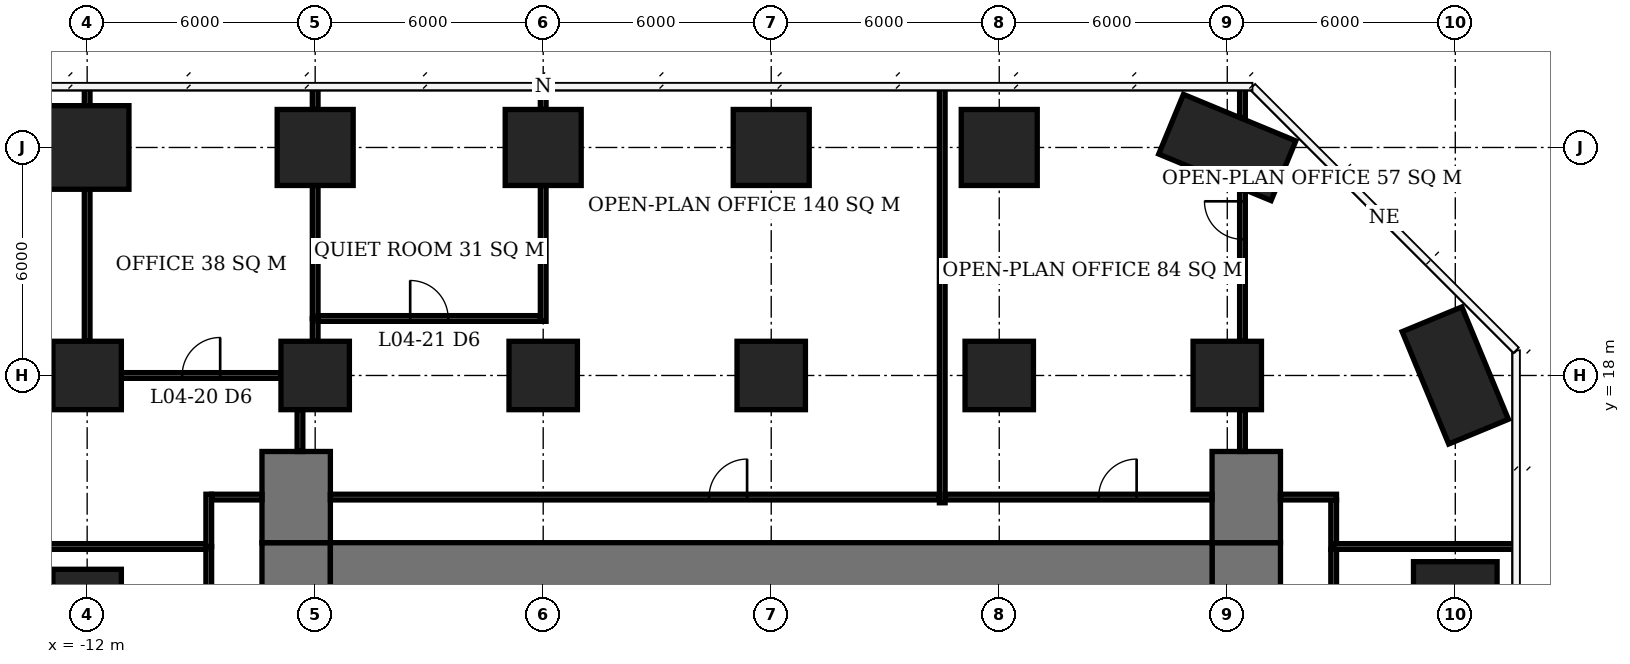
"""IFC4 building model, lengths in metres.
Left out: names, types, materials, properties, quantities, classifications, styles, units other than length and angle.
Written with IfcOpenShell. Run it as: python <this file> out.ifc"""

import sys

from ifc_helpers import new_model, si_unit, direction, frame, frame_2d, origin, origin_2d, place, context, subcontext, project, spatial, rectangle, extrude, element, fill, save


model = new_model("IFC4")
c1 = context("Model", 3, precision=1e-05, world=origin(), true_north=direction((0.0, 1.0)))
c2 = subcontext(c1, "Body", "Model", "MODEL_VIEW")
j1 = project(units=[si_unit("LENGTHUNIT", "METRE"), si_unit("PLANEANGLEUNIT", "RADIAN")], contexts=[c1])
p1 = place(None, origin())
s1 = spatial("IfcSite", under=j1, at=p1, CompositionType="ELEMENT")
p2 = place(p1, origin())
s2 = spatial("IfcBuilding", under=s1, at=p2, CompositionType="ELEMENT")
p3 = place(p2, frame((0.0, 0.0, 22.1)))
s3 = spatial("IfcBuildingStorey", under=s2, at=p3, CompositionType="ELEMENT", Elevation=22.1)
for number, where, z_axis, x_axis in (
    (1, (-12.0, 12.0, 0.0), (0.0, 0.0, 1.0), (1.0, 0.0, 0.0)),
    (2, (-12.0, 18.0, 0.0), (0.0, 0.0, 1.0), (1.0, 0.0, 0.0)),
):
    element("IfcColumn", number, at=place(p3, frame(where, z_axis=z_axis, x_axis=x_axis)), inside=s3, PredefinedType="COLUMN", context=c2, shape_type="SweptSolid", body=[
        extrude(rectangle(XDim=1.8, YDim=1.8, at=origin_2d()), origin(), (0.0, 0.0, 1.0), 3.9),
    ])
p4 = place(p3, frame((-12.0, 24.0, 0.0), z_axis=(0.0, 0.0, 1.0), x_axis=(1.0, 0.0, 0.0)))
e3 = element("IfcColumn", 3, at=p4, inside=s3, PredefinedType="COLUMN", context=c2, shape_type="SweptSolid", body=[
    extrude(rectangle(XDim=2.2, YDim=2.2, at=origin_2d()), origin(), (0.0, 0.0, 1.0), 3.9),
])
p5 = place(p3, frame((-6.0, 18.0, 0.0), z_axis=(0.0, 0.0, 1.0), x_axis=(1.0, 0.0, 0.0)))
e4 = element("IfcColumn", 4, at=p5, inside=s3, PredefinedType="COLUMN", context=c2, shape_type="SweptSolid", body=[
    extrude(rectangle(XDim=1.8, YDim=1.8, at=origin_2d()), origin(), (0.0, 0.0, 1.0), 3.9),
])
p6 = place(p3, frame((-6.0, 24.0, 0.0), z_axis=(0.0, 0.0, 1.0), x_axis=(1.0, 0.0, 0.0)))
e5 = element("IfcColumn", 5, at=p6, inside=s3, PredefinedType="COLUMN", context=c2, shape_type="SweptSolid", body=[
    extrude(rectangle(XDim=2.0, YDim=2.0, at=origin_2d()), origin(), (0.0, 0.0, 1.0), 3.9),
])
p7 = place(p3, frame((0.0, 18.0, 0.0), z_axis=(0.0, 0.0, 1.0), x_axis=(1.0, 0.0, 0.0)))
e6 = element("IfcColumn", 6, at=p7, inside=s3, PredefinedType="COLUMN", context=c2, shape_type="SweptSolid", body=[
    extrude(rectangle(XDim=1.8, YDim=1.8, at=origin_2d()), origin(), (0.0, 0.0, 1.0), 3.9),
])
p8 = place(p3, frame((0.0, 24.0, 0.0), z_axis=(0.0, 0.0, 1.0), x_axis=(1.0, 0.0, 0.0)))
e7 = element("IfcColumn", 7, at=p8, inside=s3, PredefinedType="COLUMN", context=c2, shape_type="SweptSolid", body=[
    extrude(rectangle(XDim=2.0, YDim=2.0, at=origin_2d()), origin(), (0.0, 0.0, 1.0), 3.9),
])
p9 = place(p3, frame((6.0, 18.0, 0.0), z_axis=(0.0, 0.0, 1.0), x_axis=(1.0, 0.0, 0.0)))
e8 = element("IfcColumn", 8, at=p9, inside=s3, PredefinedType="COLUMN", context=c2, shape_type="SweptSolid", body=[
    extrude(rectangle(XDim=1.8, YDim=1.8, at=origin_2d()), origin(), (0.0, 0.0, 1.0), 3.9),
])
p10 = place(p3, frame((6.0, 24.0, 0.0), z_axis=(0.0, 0.0, 1.0), x_axis=(1.0, 0.0, 0.0)))
e9 = element("IfcColumn", 9, at=p10, inside=s3, PredefinedType="COLUMN", context=c2, shape_type="SweptSolid", body=[
    extrude(rectangle(XDim=2.0, YDim=2.0, at=origin_2d()), origin(), (0.0, 0.0, 1.0), 3.9),
])
p11 = place(p3, frame((12.0, 18.0, 0.0), z_axis=(0.0, 0.0, 1.0), x_axis=(1.0, 0.0, 0.0)))
e10 = element("IfcColumn", 10, at=p11, inside=s3, PredefinedType="COLUMN", context=c2, shape_type="SweptSolid", body=[
    extrude(rectangle(XDim=1.8, YDim=1.8, at=origin_2d()), origin(), (0.0, 0.0, 1.0), 3.9),
])
p12 = place(p3, frame((12.0, 24.0, 0.0), z_axis=(0.0, 0.0, 1.0), x_axis=(1.0, 0.0, 0.0)))
e11 = element("IfcColumn", 11, at=p12, inside=s3, PredefinedType="COLUMN", context=c2, shape_type="SweptSolid", body=[
    extrude(rectangle(XDim=2.0, YDim=2.0, at=origin_2d()), origin(), (0.0, 0.0, 1.0), 3.9),
])
p13 = place(p3, frame((18.0, 18.0, 0.0), z_axis=(0.0, 0.0, 1.0), x_axis=(1.0, 0.0, 0.0)))
e12 = element("IfcColumn", 12, at=p13, inside=s3, PredefinedType="COLUMN", context=c2, shape_type="SweptSolid", body=[
    extrude(rectangle(XDim=1.8, YDim=1.8, at=origin_2d()), origin(), (0.0, 0.0, 1.0), 3.9),
])
p14 = place(p3, frame((18.0, 24.0, 0.0), z_axis=(0.0, 0.0, 1.0), x_axis=(0.923879532511, -0.382683432365, 0.0)))
e13 = element("IfcColumn", 13, at=p14, inside=s3, PredefinedType="COLUMN", context=c2, shape_type="SweptSolid", body=[
    extrude(rectangle(XDim=3.2, YDim=1.7, at=origin_2d()), origin(), (0.0, 0.0, 1.0), 3.9),
])
p15 = place(p3, frame((24.0, 12.0, 0.0), z_axis=(0.0, 0.0, 1.0), x_axis=(1.0, 0.0, 0.0)))
e14 = element("IfcColumn", 14, at=p15, inside=s3, PredefinedType="COLUMN", context=c2, shape_type="SweptSolid", body=[
    extrude(rectangle(XDim=2.2, YDim=2.2, at=origin_2d()), origin(), (0.0, 0.0, 1.0), 3.9),
])
p16 = place(p3, frame((24.0, 18.0, 0.0), z_axis=(0.0, 0.0, 1.0), x_axis=(0.382683432365, -0.923879532511, 0.0)))
e15 = element("IfcColumn", 15, at=p16, inside=s3, PredefinedType="COLUMN", context=c2, shape_type="SweptSolid", body=[
    extrude(rectangle(XDim=3.2, YDim=1.7, at=origin_2d()), origin(), (0.0, 0.0, 1.0), 3.9),
])
p17 = place(p3, frame((-5.6, 12.6, 0.0), z_axis=(0.0, 0.0, 1.0), x_axis=(1.0, 0.0, 0.0)))
e16 = element("IfcWall", 16, at=p17, inside=s3, PredefinedType="SHEAR", context=c2, shape_type="SweptSolid", body=[
    extrude(rectangle(XDim=23.2, YDim=2.0, at=frame_2d((11.6, 0.0))), origin(), (0.0, 0.0, 1.0), 3.9),
])
p18 = place(p3, frame((-6.5, -7.6, 0.0), z_axis=(0.0, 0.0, 1.0), x_axis=(0.0, 1.0, 0.0)))
e17 = element("IfcWall", 17, at=p18, inside=s3, PredefinedType="SHEAR", context=c2, shape_type="SweptSolid", body=[
    extrude(rectangle(XDim=21.2, YDim=1.8, at=frame_2d((10.6, 0.0))), origin(), (0.0, 0.0, 1.0), 3.9),
])
p19 = place(p18, frame((7.8, 0.0, 0.0)))
e18 = element("IfcOpeningElement", 18, at=p19, cuts=e17, PredefinedType="OPENING", context=c2, shape_type="SweptSolid", body=[
    extrude(rectangle(XDim=1.8, YDim=2.4, at=frame_2d((0.9, 1.2))), frame((0.0, 0.91, 0.0), z_axis=(0.0, -1.0, 0.0), x_axis=(1.0, 0.0, 0.0)), (0.0, 0.0, 1.0), 1.82),
])
p20 = place(p3, frame((18.5, -7.6, 0.0), z_axis=(0.0, 0.0, 1.0), x_axis=(0.0, 1.0, 0.0)))
e19 = element("IfcWall", 19, at=p20, inside=s3, PredefinedType="SHEAR", context=c2, shape_type="SweptSolid", body=[
    extrude(rectangle(XDim=21.2, YDim=1.8, at=frame_2d((10.6, 0.0))), origin(), (0.0, 0.0, 1.0), 3.9),
])
p21 = place(p20, frame((9.2, 0.0, 0.0)))
e20 = element("IfcOpeningElement", 20, at=p21, cuts=e19, PredefinedType="OPENING", context=c2, shape_type="SweptSolid", body=[
    extrude(rectangle(XDim=1.8, YDim=2.4, at=frame_2d((0.9, 1.2))), frame((0.0, 0.91, 0.0), z_axis=(0.0, -1.0, 0.0), x_axis=(1.0, 0.0, 0.0)), (0.0, 0.0, 1.0), 1.82),
])
for number, where, z_axis, x_axis in (
    (21, (-6.5, 13.6, 0.0), (0.0, 0.0, 1.0), (0.0, 1.0, 0.0)),
    (22, (18.5, 13.6, 0.0), (0.0, 0.0, 1.0), (0.0, 1.0, 0.0)),
):
    element("IfcWall", number, at=place(p3, frame(where, z_axis=z_axis, x_axis=x_axis)), inside=s3, PredefinedType="SHEAR", context=c2, shape_type="SweptSolid", body=[
        extrude(rectangle(XDim=2.4, YDim=1.8, at=frame_2d((1.2, 0.0))), origin(), (0.0, 0.0, 1.0), 3.9),
    ])
p22 = place(p3, frame((-11.1, 18.0, 0.0), z_axis=(0.0, 0.0, 1.0), x_axis=(1.0, 0.0, 0.0)))
e23 = element("IfcWall", 23, at=p22, inside=s3, PredefinedType="PARTITIONING", context=c2, shape_type="SweptSolid", body=[
    extrude(rectangle(XDim=4.2, YDim=0.15, at=frame_2d((2.1, 0.0))), origin(), (0.0, 0.0, 1.0), 3.65),
])
p23 = place(p22, frame((1.6, 0.0, 0.0)))
e24 = element("IfcOpeningElement", 24, at=p23, cuts=e23, PredefinedType="OPENING", context=c2, shape_type="SweptSolid", body=[
    extrude(rectangle(XDim=1.0, YDim=2.1, at=frame_2d((0.5, 1.05))), frame((0.0, 0.085, 0.0), z_axis=(0.0, -1.0, 0.0), x_axis=(1.0, 0.0, 0.0)), (0.0, 0.0, 1.0), 0.17),
])
p24 = place(p3, frame((-5.925, 19.5, 0.0), z_axis=(0.0, 0.0, 1.0), x_axis=(1.0, 0.0, 0.0)))
e25 = element("IfcWall", 25, at=p24, inside=s3, PredefinedType="PARTITIONING", context=c2, shape_type="SweptSolid", body=[
    extrude(rectangle(XDim=5.85, YDim=0.15, at=frame_2d((2.925, 0.0))), origin(), (0.0, 0.0, 1.0), 3.65),
])
p25 = place(p24, frame((2.425, 0.0, 0.0)))
e26 = element("IfcOpeningElement", 26, at=p25, cuts=e25, PredefinedType="OPENING", context=c2, shape_type="SweptSolid", body=[
    extrude(rectangle(XDim=1.0, YDim=2.1, at=frame_2d((0.5, 1.05))), frame((0.0, 0.085, 0.0), z_axis=(0.0, -1.0, 0.0), x_axis=(1.0, 0.0, 0.0)), (0.0, 0.0, 1.0), 0.17),
])
p26 = place(p3, frame((-12.0, 18.9, 0.0), z_axis=(0.0, 0.0, 1.0), x_axis=(0.0, 1.0, 0.0)))
e27 = element("IfcWall", 27, at=p26, inside=s3, PredefinedType="PARTITIONING", context=c2, shape_type="SweptSolid", body=[
    extrude(rectangle(XDim=4.0, YDim=0.15, at=frame_2d((2.0, 0.0))), origin(), (0.0, 0.0, 1.0), 3.65),
])
p27 = place(p3, frame((-12.0, 25.1, 0.0), z_axis=(0.0, 0.0, 1.0), x_axis=(0.0, 1.0, 0.0)))
e28 = element("IfcWall", 28, at=p27, inside=s3, PredefinedType="PARTITIONING", context=c2, shape_type="SweptSolid", body=[
    extrude(rectangle(XDim=0.5, YDim=0.15, at=frame_2d((0.25, 0.0))), origin(), (0.0, 0.0, 1.0), 3.65),
])
p28 = place(p3, frame((-6.0, 18.9, 0.0), z_axis=(0.0, 0.0, 1.0), x_axis=(0.0, 1.0, 0.0)))
e29 = element("IfcWall", 29, at=p28, inside=s3, PredefinedType="PARTITIONING", context=c2, shape_type="SweptSolid", body=[
    extrude(rectangle(XDim=0.6, YDim=0.15, at=frame_2d((0.3, 0.0))), origin(), (0.0, 0.0, 1.0), 3.65),
])
p29 = place(p3, frame((-6.0, 19.5, 0.0), z_axis=(0.0, 0.0, 1.0), x_axis=(0.0, 1.0, 0.0)))
e30 = element("IfcWall", 30, at=p29, inside=s3, PredefinedType="PARTITIONING", context=c2, shape_type="SweptSolid", body=[
    extrude(rectangle(XDim=3.5, YDim=0.15, at=frame_2d((1.75, 0.0))), origin(), (0.0, 0.0, 1.0), 3.65),
])
p30 = place(p3, frame((-6.0, 25.0, 0.0), z_axis=(0.0, 0.0, 1.0), x_axis=(0.0, 1.0, 0.0)))
e31 = element("IfcWall", 31, at=p30, inside=s3, PredefinedType="PARTITIONING", context=c2, shape_type="SweptSolid", body=[
    extrude(rectangle(XDim=0.6, YDim=0.15, at=frame_2d((0.3, 0.0))), origin(), (0.0, 0.0, 1.0), 3.65),
])
p31 = place(p3, frame((0.0, 19.425, 0.0), z_axis=(0.0, 0.0, 1.0), x_axis=(0.0, 1.0, 0.0)))
e32 = element("IfcWall", 32, at=p31, inside=s3, PredefinedType="PARTITIONING", context=c2, shape_type="SweptSolid", body=[
    extrude(rectangle(XDim=3.575, YDim=0.15, at=frame_2d((1.788, 0.0))), origin(), (0.0, 0.0, 1.0), 3.65),
])
p32 = place(p3, frame((0.0, 25.0, 0.0), z_axis=(0.0, 0.0, 1.0), x_axis=(0.0, 1.0, 0.0)))
e33 = element("IfcWall", 33, at=p32, inside=s3, PredefinedType="PARTITIONING", context=c2, shape_type="SweptSolid", body=[
    extrude(rectangle(XDim=0.55, YDim=0.15, at=frame_2d((0.275, 0.0))), origin(), (0.0, 0.0, 1.0), 3.65),
])
p33 = place(p3, frame((-25.6, 13.5, 0.0), z_axis=(0.0, 0.0, 1.0), x_axis=(1.0, 0.0, 0.0)))
e34 = element("IfcWall", 34, at=p33, inside=s3, PredefinedType="PARTITIONING", context=c2, shape_type="SweptSolid", body=[
    extrude(rectangle(XDim=16.725, YDim=0.15, at=frame_2d((8.363, 0.0))), origin(), (0.0, 0.0, 1.0), 3.65),
])
p34 = place(p33, frame((10.455, 0.0, 0.0)))
e35 = element("IfcOpeningElement", 35, at=p34, cuts=e34, PredefinedType="OPENING", context=c2, shape_type="SweptSolid", body=[
    extrude(rectangle(XDim=1.0, YDim=2.1, at=frame_2d((0.5, 1.05))), frame((0.0, 0.085, 0.0), z_axis=(0.0, -1.0, 0.0), x_axis=(1.0, 0.0, 0.0)), (0.0, 0.0, 1.0), 0.17),
])
p35 = place(p3, frame((-8.8, 4.575, 0.0), z_axis=(0.0, 0.0, 1.0), x_axis=(0.0, 1.0, 0.0)))
e36 = element("IfcWall", 36, at=p35, inside=s3, PredefinedType="PARTITIONING", context=c2, shape_type="SweptSolid", body=[
    extrude(rectangle(XDim=8.925, YDim=0.15, at=frame_2d((4.462, 0.0))), origin(), (0.0, 0.0, 1.0), 3.65),
])
p36 = place(p35, frame((2.575, 0.0, 0.0)))
e37 = element("IfcOpeningElement", 37, at=p36, cuts=e36, PredefinedType="OPENING", context=c2, shape_type="SweptSolid", body=[
    extrude(rectangle(XDim=1.0, YDim=2.1, at=frame_2d((0.5, 1.05))), frame((0.0, 0.085, 0.0), z_axis=(0.0, -1.0, 0.0), x_axis=(1.0, 0.0, 0.0)), (0.0, 0.0, 1.0), 0.17),
])
p37 = place(p3, frame((-8.8, 13.5, 0.0), z_axis=(0.0, 0.0, 1.0), x_axis=(0.0, 1.0, 0.0)))
e38 = element("IfcWall", 38, at=p37, inside=s3, PredefinedType="PARTITIONING", context=c2, shape_type="SweptSolid", body=[
    extrude(rectangle(XDim=1.375, YDim=0.15, at=frame_2d((0.688, 0.0))), origin(), (0.0, 0.0, 1.0), 3.65),
])
p38 = place(p3, frame((-8.725, 14.8, 0.0), z_axis=(0.0, 0.0, 1.0), x_axis=(1.0, 0.0, 0.0)))
e39 = element("IfcWall", 39, at=p38, inside=s3, PredefinedType="PARTITIONING", context=c2, shape_type="SweptSolid", body=[
    extrude(rectangle(XDim=1.325, YDim=0.15, at=frame_2d((0.663, 0.0))), origin(), (0.0, 0.0, 1.0), 3.65),
])
p39 = place(p3, frame((-6.4, 16.0, 0.0), z_axis=(0.0, 0.0, 1.0), x_axis=(0.0, 1.0, 0.0)))
e40 = element("IfcWall", 40, at=p39, inside=s3, PredefinedType="PARTITIONING", context=c2, shape_type="SweptSolid", body=[
    extrude(rectangle(XDim=1.1, YDim=0.15, at=frame_2d((0.55, 0.0))), origin(), (0.0, 0.0, 1.0), 3.65),
])
p40 = place(p3, frame((-5.6, 14.8, 0.0), z_axis=(0.0, 0.0, 1.0), x_axis=(1.0, 0.0, 0.0)))
e41 = element("IfcWall", 41, at=p40, inside=s3, PredefinedType="PARTITIONING", context=c2, shape_type="SweptSolid", body=[
    extrude(rectangle(XDim=16.025, YDim=0.15, at=frame_2d((8.013, 0.0))), origin(), (0.0, 0.0, 1.0), 3.65),
])
p41 = place(p40, frame((9.965, 0.0, 0.0)))
e42 = element("IfcOpeningElement", 42, at=p41, cuts=e41, PredefinedType="OPENING", context=c2, shape_type="SweptSolid", body=[
    extrude(rectangle(XDim=1.0, YDim=2.1, at=frame_2d((0.5, 1.05))), frame((0.0, 0.085, 0.0), z_axis=(0.0, -1.0, 0.0), x_axis=(1.0, 0.0, 0.0)), (0.0, 0.0, 1.0), 0.17),
])
p42 = place(p3, frame((10.5, 14.65, 0.0), z_axis=(0.0, 0.0, 1.0), x_axis=(0.0, 1.0, 0.0)))
e43 = element("IfcWall", 43, at=p42, inside=s3, PredefinedType="PARTITIONING", context=c2, shape_type="SweptSolid", body=[
    extrude(rectangle(XDim=10.95, YDim=0.15, at=frame_2d((5.475, 0.0))), origin(), (0.0, 0.0, 1.0), 3.65),
])
p43 = place(p3, frame((10.575, 14.8, 0.0), z_axis=(0.0, 0.0, 1.0), x_axis=(1.0, 0.0, 0.0)))
e44 = element("IfcWall", 44, at=p43, inside=s3, PredefinedType="PARTITIONING", context=c2, shape_type="SweptSolid", body=[
    extrude(rectangle(XDim=7.025, YDim=0.15, at=frame_2d((3.513, 0.0))), origin(), (0.0, 0.0, 1.0), 3.65),
])
p44 = place(p43, frame((4.04, 0.0, 0.0)))
e45 = element("IfcOpeningElement", 45, at=p44, cuts=e44, PredefinedType="OPENING", context=c2, shape_type="SweptSolid", body=[
    extrude(rectangle(XDim=1.0, YDim=2.1, at=frame_2d((0.5, 1.05))), frame((0.0, 0.085, 0.0), z_axis=(0.0, -1.0, 0.0), x_axis=(1.0, 0.0, 0.0)), (0.0, 0.0, 1.0), 0.17),
])
p45 = place(p3, frame((18.4, 16.0, 0.0), z_axis=(0.0, 0.0, 1.0), x_axis=(0.0, 1.0, 0.0)))
e46 = element("IfcWall", 46, at=p45, inside=s3, PredefinedType="PARTITIONING", context=c2, shape_type="SweptSolid", body=[
    extrude(rectangle(XDim=1.1, YDim=0.15, at=frame_2d((0.55, 0.0))), origin(), (0.0, 0.0, 1.0), 3.65),
])
p46 = place(p3, frame((18.4, 18.9, 0.0), z_axis=(0.0, 0.0, 1.0), x_axis=(0.0, 1.0, 0.0)))
e47 = element("IfcWall", 47, at=p46, inside=s3, PredefinedType="PARTITIONING", context=c2, shape_type="SweptSolid", body=[
    extrude(rectangle(XDim=3.983, YDim=0.15, at=frame_2d((1.992, 0.0))), origin(), (0.0, 0.0, 1.0), 3.65),
])
p47 = place(p46, frame((2.683, 0.0, 0.0)))
e48 = element("IfcOpeningElement", 48, at=p47, cuts=e47, PredefinedType="OPENING", context=c2, shape_type="SweptSolid", body=[
    extrude(rectangle(XDim=1.0, YDim=2.1, at=frame_2d((0.5, 1.05))), frame((0.0, 0.085, 0.0), z_axis=(0.0, -1.0, 0.0), x_axis=(1.0, 0.0, 0.0)), (0.0, 0.0, 1.0), 0.17),
])
p48 = place(p3, frame((18.4, 24.785, 0.0), z_axis=(0.0, 0.0, 1.0), x_axis=(0.0, 1.0, 0.0)))
e49 = element("IfcWall", 49, at=p48, inside=s3, PredefinedType="PARTITIONING", context=c2, shape_type="SweptSolid", body=[
    extrude(rectangle(XDim=0.815, YDim=0.15, at=frame_2d((0.407, 0.0))), origin(), (0.0, 0.0, 1.0), 3.65),
])
p49 = place(p3, frame((19.4, 14.8, 0.0), z_axis=(0.0, 0.0, 1.0), x_axis=(1.0, 0.0, 0.0)))
e50 = element("IfcWall", 50, at=p49, inside=s3, PredefinedType="PARTITIONING", context=c2, shape_type="SweptSolid", body=[
    extrude(rectangle(XDim=1.475, YDim=0.15, at=frame_2d((0.738, 0.0))), origin(), (0.0, 0.0, 1.0), 3.65),
])
p50 = place(p3, frame((20.8, -8.725, 0.0), z_axis=(0.0, 0.0, 1.0), x_axis=(0.0, 1.0, 0.0)))
e51 = element("IfcWall", 51, at=p50, inside=s3, PredefinedType="PARTITIONING", context=c2, shape_type="SweptSolid", body=[
    extrude(rectangle(XDim=22.15, YDim=0.15, at=frame_2d((11.075, 0.0))), origin(), (0.0, 0.0, 1.0), 3.65),
])
p51 = place(p50, frame((7.23, 0.0, 0.0)))
e52 = element("IfcOpeningElement", 52, at=p51, cuts=e51, PredefinedType="OPENING", context=c2, shape_type="SweptSolid", body=[
    extrude(rectangle(XDim=1.0, YDim=2.1, at=frame_2d((0.5, 1.05))), frame((0.0, 0.085, 0.0), z_axis=(0.0, -1.0, 0.0), x_axis=(1.0, 0.0, 0.0)), (0.0, 0.0, 1.0), 0.17),
])
p52 = place(p3, frame((20.8, 13.425, 0.0), z_axis=(0.0, 0.0, 1.0), x_axis=(0.0, 1.0, 0.0)))
e53 = element("IfcWall", 53, at=p52, inside=s3, PredefinedType="PARTITIONING", context=c2, shape_type="SweptSolid", body=[
    extrude(rectangle(XDim=1.3, YDim=0.15, at=frame_2d((0.65, 0.0))), origin(), (0.0, 0.0, 1.0), 3.65),
])
p53 = place(p3, frame((20.8, 13.5, 0.0), z_axis=(0.0, 0.0, 1.0), x_axis=(1.0, 0.0, 0.0)))
e54 = element("IfcWall", 54, at=p53, inside=s3, PredefinedType="PARTITIONING", context=c2, shape_type="SweptSolid", body=[
    extrude(rectangle(XDim=4.8, YDim=0.15, at=frame_2d((2.4, 0.0))), origin(), (0.0, 0.0, 1.0), 3.65),
])
p54 = place(p23, origin())
e55 = element("IfcDoor", 55, at=p54, inside=s3, OperationType="SINGLE_SWING_RIGHT", PredefinedType="DOOR", context=c2, shape_type="SweptSolid", body=[
    extrude(rectangle(XDim=1.0, YDim=2.1, at=frame_2d((0.5, 1.05))), frame((0.0, 0.025, 0.0), z_axis=(0.0, -1.0, 0.0), x_axis=(1.0, 0.0, 0.0)), (0.0, 0.0, 1.0), 0.05),
])
fill(e24, e55)
p55 = place(p25, origin())
e56 = element("IfcDoor", 56, at=p55, inside=s3, OperationType="SINGLE_SWING_LEFT", PredefinedType="DOOR", context=c2, shape_type="SweptSolid", body=[
    extrude(rectangle(XDim=1.0, YDim=2.1, at=frame_2d((0.5, 1.05))), frame((0.0, 0.025, 0.0), z_axis=(0.0, -1.0, 0.0), x_axis=(1.0, 0.0, 0.0)), (0.0, 0.0, 1.0), 0.05),
])
fill(e26, e56)
p56 = place(p47, origin())
e57 = element("IfcDoor", 57, at=p56, inside=s3, OperationType="SINGLE_SWING_RIGHT", PredefinedType="DOOR", context=c2, shape_type="SweptSolid", body=[
    extrude(rectangle(XDim=1.0, YDim=2.1, at=frame_2d((0.5, 1.05))), frame((0.0, 0.025, 0.0), z_axis=(0.0, -1.0, 0.0), x_axis=(1.0, 0.0, 0.0)), (0.0, 0.0, 1.0), 0.05),
])
fill(e48, e57)
p57 = place(p41, origin())
e58 = element("IfcDoor", 58, at=p57, inside=s3, OperationType="SINGLE_SWING_RIGHT", PredefinedType="DOOR", context=c2, shape_type="SweptSolid", body=[
    extrude(rectangle(XDim=1.0, YDim=2.1, at=frame_2d((0.5, 1.05))), frame((0.0, 0.025, 0.0), z_axis=(0.0, -1.0, 0.0), x_axis=(1.0, 0.0, 0.0)), (0.0, 0.0, 1.0), 0.05),
])
fill(e42, e58)
p58 = place(p44, origin())
e59 = element("IfcDoor", 59, at=p58, inside=s3, OperationType="SINGLE_SWING_RIGHT", PredefinedType="DOOR", context=c2, shape_type="SweptSolid", body=[
    extrude(rectangle(XDim=1.0, YDim=2.1, at=frame_2d((0.5, 1.05))), frame((0.0, 0.025, 0.0), z_axis=(0.0, -1.0, 0.0), x_axis=(1.0, 0.0, 0.0)), (0.0, 0.0, 1.0), 0.05),
])
fill(e45, e59)
save(model, sys.argv[1])
